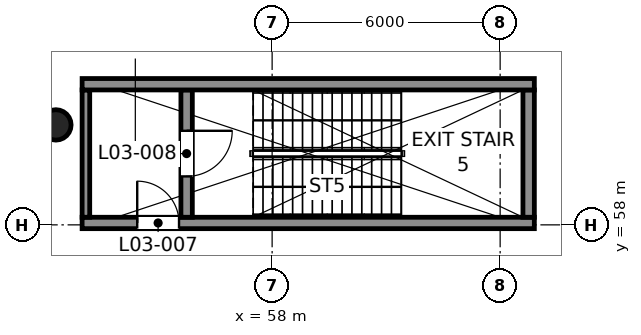
"""IFC4 building model, lengths in metres.
Left out: names, types, materials, properties, quantities, classifications, styles, units other than length and angle.
Written with IfcOpenShell. Run it as: python <this file> out.ifc"""

import sys

from ifc_helpers import new_model, si_unit, direction, frame, frame_2d, origin, origin_2d, place, context, subcontext, project, spatial, rectangle, circle, extrude, element, fill, save


model = new_model("IFC4")
c1 = context("Model", 3, precision=1e-05, world=origin(), true_north=direction((0.0, 1.0)))
c2 = subcontext(c1, "Body", "Model", "MODEL_VIEW")
j1 = project(units=[si_unit("LENGTHUNIT", "METRE"), si_unit("PLANEANGLEUNIT", "RADIAN")], contexts=[c1])
p1 = place(None, origin())
s1 = spatial("IfcSite", under=j1, at=p1, CompositionType="ELEMENT")
p2 = place(p1, origin())
s2 = spatial("IfcBuilding", under=s1, at=p2, CompositionType="ELEMENT")
p3 = place(p2, frame((0.0, 0.0, 23.0)))
s3 = spatial("IfcBuildingStorey", under=s2, at=p3, CompositionType="ELEMENT", Elevation=23.0)
p4 = place(p3, frame((52.31, 60.63, 0.0), z_axis=(0.0, 0.0, 1.0), x_axis=(1.0, 0.0, 0.0)))
e1 = element("IfcColumn", 1, at=p4, inside=s3, PredefinedType="COLUMN", context=c2, shape_type="SweptSolid", body=[
    extrude(circle(Radius=0.4, at=origin_2d()), origin(), (0.0, 0.0, 1.0), 6.0),
])
p5 = place(p3, frame((53.0, 58.05, 0.0), z_axis=(0.0, 0.0, 1.0), x_axis=(1.0, 0.0, 0.0)))
e2 = element("IfcWall", 2, at=p5, inside=s3, PredefinedType="SHEAR", context=c2, shape_type="SweptSolid", body=[
    extrude(rectangle(XDim=11.9, YDim=0.3, at=frame_2d((5.95, 0.0))), origin(), (0.0, 0.0, 1.0), 6.0),
])
p6 = place(p5, frame((1.45, 0.0, 0.0)))
e3 = element("IfcOpeningElement", 3, at=p6, cuts=e2, PredefinedType="OPENING", context=c2, shape_type="SweptSolid", body=[
    extrude(rectangle(XDim=1.1, YDim=2.1, at=frame_2d((0.55, 1.05))), frame((0.0, 0.16, 0.0), z_axis=(0.0, -1.0, 0.0), x_axis=(1.0, 0.0, 0.0)), (0.0, 0.0, 1.0), 0.32),
])
p7 = place(p3, frame((53.1, 58.2, 0.0), z_axis=(0.0, 0.0, 1.0), x_axis=(0.0, 1.0, 0.0)))
e4 = element("IfcWall", 4, at=p7, inside=s3, PredefinedType="SHEAR", context=c2, shape_type="SweptSolid", body=[
    extrude(rectangle(XDim=3.35, YDim=0.2, at=frame_2d((1.675, 0.0))), origin(), (0.0, 0.0, 1.0), 6.0),
])
p8 = place(p3, frame((55.75, 58.2, 0.0), z_axis=(0.0, 0.0, 1.0), x_axis=(0.0, 1.0, 0.0)))
e5 = element("IfcWall", 5, at=p8, inside=s3, PredefinedType="SHEAR", context=c2, shape_type="SweptSolid", body=[
    extrude(rectangle(XDim=3.35, YDim=0.3, at=frame_2d((1.675, 0.0))), origin(), (0.0, 0.0, 1.0), 6.0),
])
p9 = place(p8, frame((1.075, 0.0, 0.0)))
e6 = element("IfcOpeningElement", 6, at=p9, cuts=e5, PredefinedType="OPENING", context=c2, shape_type="SweptSolid", body=[
    extrude(rectangle(XDim=1.2, YDim=2.1, at=frame_2d((0.6, 1.05))), frame((0.0, 0.16, 0.0), z_axis=(0.0, -1.0, 0.0), x_axis=(1.0, 0.0, 0.0)), (0.0, 0.0, 1.0), 0.32),
])
p10 = place(p3, frame((64.75, 58.2, 0.0), z_axis=(0.0, 0.0, 1.0), x_axis=(0.0, 1.0, 0.0)))
e7 = element("IfcWall", 7, at=p10, inside=s3, PredefinedType="SHEAR", context=c2, shape_type="SweptSolid", body=[
    extrude(rectangle(XDim=3.35, YDim=0.3, at=frame_2d((1.675, 0.0))), origin(), (0.0, 0.0, 1.0), 6.0),
])
p11 = place(p3, frame((53.0, 61.7, 0.0), z_axis=(0.0, 0.0, 1.0), x_axis=(1.0, 0.0, 0.0)))
e8 = element("IfcWall", 8, at=p11, inside=s3, PredefinedType="SHEAR", context=c2, shape_type="SweptSolid", body=[
    extrude(rectangle(XDim=11.9, YDim=0.3, at=frame_2d((5.95, 0.0))), origin(), (0.0, 0.0, 1.0), 6.0),
])
p12 = place(p6, origin())
e9 = element("IfcDoor", 9, at=p12, inside=s3, OperationType="SINGLE_SWING_LEFT", PredefinedType="DOOR", context=c2, shape_type="SweptSolid", body=[
    extrude(rectangle(XDim=1.1, YDim=2.1, at=frame_2d((0.55, 1.05))), frame((0.0, 0.025, 0.0), z_axis=(0.0, -1.0, 0.0), x_axis=(1.0, 0.0, 0.0)), (0.0, 0.0, 1.0), 0.05),
])
fill(e3, e9)
p13 = place(p9, frame((1.2, 0.0, 0.0), z_axis=(0.0, 0.0, 1.0), x_axis=(-1.0, 0.0, 0.0)))
e10 = element("IfcDoor", 10, at=p13, inside=s3, OperationType="SINGLE_SWING_LEFT", PredefinedType="DOOR", context=c2, shape_type="SweptSolid", body=[
    extrude(rectangle(XDim=1.2, YDim=2.1, at=frame_2d((0.6, 1.05))), frame((0.0, 0.025, 0.0), z_axis=(0.0, -1.0, 0.0), x_axis=(1.0, 0.0, 0.0)), (0.0, 0.0, 1.0), 0.05),
])
fill(e6, e10)
save(model, sys.argv[1])
